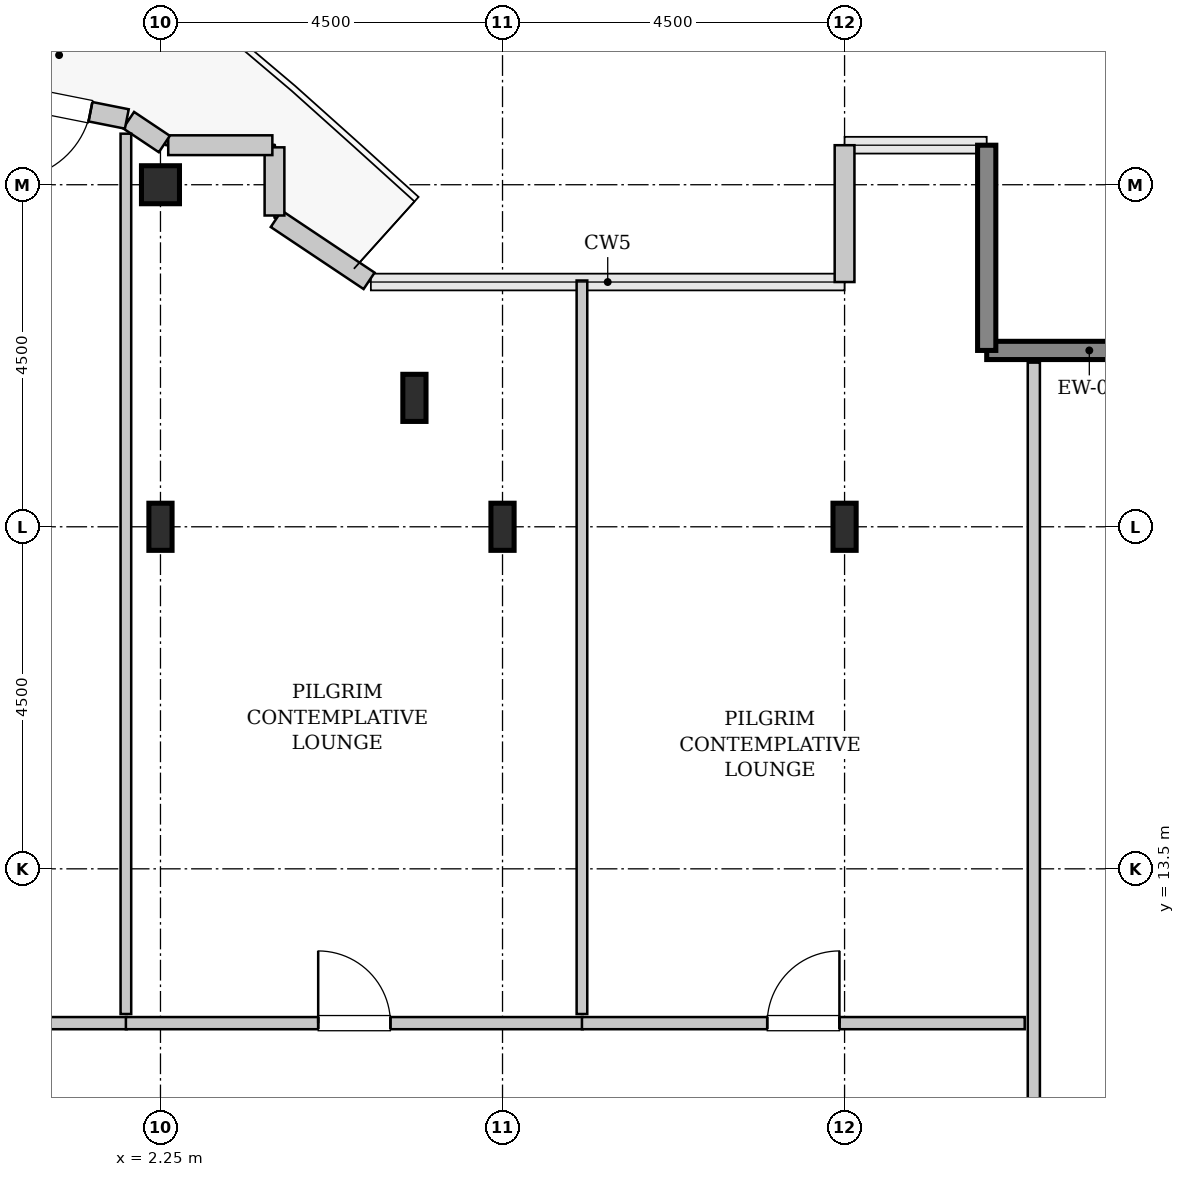
"""IFC4 building model, lengths in metres.
Left out: names, types, materials, properties, quantities, classifications, styles, units other than length and angle.
Written with IfcOpenShell. Run it as: python <this file> out.ifc"""

import sys

from ifc_helpers import new_model, si_unit, direction, frame, frame_2d, origin, origin_2d, place, context, subcontext, project, spatial, rectangle, hollow_rectangle, i_section, extrude, source, transform, mapped, element, fill, save


model = new_model("IFC4")
c1 = context("Model", 3, precision=1e-05, world=origin(), true_north=direction((0.0, 1.0)))
c2 = subcontext(c1, "Body", "Model", "MODEL_VIEW")
j1 = project(units=[si_unit("LENGTHUNIT", "METRE"), si_unit("PLANEANGLEUNIT", "RADIAN")], contexts=[c1])
p1 = place(None, origin())
s1 = spatial("IfcSite", under=j1, at=p1, CompositionType="ELEMENT")
p2 = place(p1, origin())
s2 = spatial("IfcBuilding", under=s1, at=p2, CompositionType="ELEMENT")
p3 = place(p2, frame((0.0, 0.0, 291.2)))
s3 = spatial("IfcBuildingStorey", under=s2, at=p3, CompositionType="ELEMENT", Elevation=291.2)
m1 = source(origin(), c2, "Body", "SweptSolid", [
    extrude(i_section(OverallWidth=0.305, OverallDepth=0.62, WebThickness=0.021, FlangeThickness=0.04, FilletRadius=0.027, at=origin_2d()), origin(), (0.0, 0.0, 1.0), 3.8),
])
p4 = place(p3, frame((2.25, 18.0, 0.0), z_axis=(0.0, 0.0, 1.0), x_axis=(1.0, 0.0, 0.0)))
e1 = element("IfcColumn", 1, at=p4, inside=s3, PredefinedType="COLUMN", context=c2, shape_type="MappedRepresentation", body=[
    mapped(m1, transform((0.0, 0.0, 0.0), x_axis=(1.0, 0.0, 0.0), y_axis=(0.0, 1.0, 0.0), z_axis=(0.0, 0.0, 1.0), scale=1.0)),
])
m2 = source(origin(), c2, "Body", "SweptSolid", [
    extrude(hollow_rectangle(XDim=0.5, YDim=0.5, WallThickness=0.025, InnerFilletRadius=0.025, OuterFilletRadius=0.05, at=origin_2d()), origin(), (0.0, 0.0, 1.0), 3.8),
])
p5 = place(p3, frame((2.25, 22.5, 0.0), z_axis=(0.0, 0.0, 1.0), x_axis=(1.0, 0.0, 0.0)))
e2 = element("IfcColumn", 2, at=p5, inside=s3, PredefinedType="COLUMN", context=c2, shape_type="MappedRepresentation", body=[
    mapped(m2, transform((0.0, 0.0, 0.0), x_axis=(1.0, 0.0, 0.0), y_axis=(0.0, 1.0, 0.0), z_axis=(0.0, 0.0, 1.0), scale=1.0)),
])
for number, where, z_axis, x_axis in (
    (3, (5.591, 19.696, 0.0), (0.0, 0.0, 1.0), (1.0, 0.0, 0.0)),
    (4, (6.75, 18.0, 0.0), (0.0, 0.0, 1.0), (1.0, 0.0, 0.0)),
    (5, (11.25, 18.0, 0.0), (0.0, 0.0, 1.0), (1.0, 0.0, 0.0)),
):
    element("IfcColumn", number, at=place(p3, frame(where, z_axis=z_axis, x_axis=x_axis)), inside=s3, PredefinedType="COLUMN", context=c2, shape_type="MappedRepresentation", body=[
        mapped(m1, transform((0.0, 0.0, 0.0), x_axis=(1.0, 0.0, 0.0), y_axis=(0.0, 1.0, 0.0), z_axis=(0.0, 0.0, 1.0), scale=1.0)),
    ])
m3 = source(origin(), c2, "Body", "SweptSolid", [
    extrude(rectangle(XDim=2.7, YDim=0.24, at=frame_2d((1.35, 0.0))), origin(), (0.0, 0.0, 1.0), 3.55),
])
for number, where, z_axis, x_axis in (
    (6, (15.82, 20.32, 0.0), (0.0, 0.0, 1.0), (-1.0, 0.0, 0.0)),
    (7, (13.12, 20.32, 0.0), (0.0, 0.0, 1.0), (0.0, 1.0, 0.0)),
):
    element("IfcWall", number, at=place(p3, frame(where, z_axis=z_axis, x_axis=x_axis)), inside=s3, PredefinedType="SHEAR", context=c2, shape_type="MappedRepresentation", body=[
        mapped(m3, transform((0.0, 0.0, 0.0), x_axis=(1.0, 0.0, 0.0), y_axis=(0.0, 1.0, 0.0), z_axis=(0.0, 0.0, 1.0), scale=1.0)),
    ])
m4 = source(origin(), c2, "Body", "SweptSolid", [
    extrude(rectangle(XDim=1.8, YDim=0.26, at=frame_2d((0.9, 0.0))), origin(), (0.0, 0.0, 1.0), 3.55),
])
p6 = place(p3, frame((11.25, 23.02, 0.0), z_axis=(0.0, 0.0, 1.0), x_axis=(0.0, -1.0, 0.0)))
e8 = element("IfcWall", 8, at=p6, inside=s3, PredefinedType="SOLIDWALL", context=c2, shape_type="MappedRepresentation", body=[
    mapped(m4, transform((0.0, 0.0, 0.0), x_axis=(1.0, 0.0, 0.0), y_axis=(0.0, 1.0, 0.0), z_axis=(0.0, 0.0, 1.0), scale=1.0)),
])
m5 = source(origin(), c2, "Body", "SweptSolid", [
    extrude(rectangle(XDim=1.469, YDim=0.26, at=frame_2d((0.734, 0.0))), origin(), (0.0, 0.0, 1.0), 3.55),
])
p7 = place(p3, frame((4.995, 21.236, 0.0), z_axis=(0.0, 0.0, 1.0), x_axis=(-0.831461760506, 0.555581983884, 0.0)))
e9 = element("IfcWall", 9, at=p7, inside=s3, PredefinedType="SOLIDWALL", context=c2, shape_type="MappedRepresentation", body=[
    mapped(m5, transform((0.0, 0.0, 0.0), x_axis=(1.0, 0.0, 0.0), y_axis=(0.0, 1.0, 0.0), z_axis=(0.0, 0.0, 1.0), scale=1.0)),
])
m6 = source(origin(), c2, "Body", "SweptSolid", [
    extrude(rectangle(XDim=0.897, YDim=0.26, at=frame_2d((0.448, 0.0))), origin(), (0.0, 0.0, 1.0), 3.55),
])
p8 = place(p3, frame((3.75, 22.095, 0.0), z_axis=(0.0, 0.0, 1.0), x_axis=(0.0, 1.0, 0.0)))
e10 = element("IfcWall", 10, at=p8, inside=s3, PredefinedType="SOLIDWALL", context=c2, shape_type="MappedRepresentation", body=[
    mapped(m6, transform((0.0, 0.0, 0.0), x_axis=(1.0, 0.0, 0.0), y_axis=(0.0, 1.0, 0.0), z_axis=(0.0, 0.0, 1.0), scale=1.0)),
])
m7 = source(origin(), c2, "Body", "SweptSolid", [
    extrude(rectangle(XDim=1.37, YDim=0.26, at=frame_2d((0.685, 0.0))), origin(), (0.0, 0.0, 1.0), 3.55),
])
p9 = place(p3, frame((3.722, 23.02, 0.0), z_axis=(0.0, 0.0, 1.0), x_axis=(-1.0, 0.0, 0.0)))
e11 = element("IfcWall", 11, at=p9, inside=s3, PredefinedType="SOLIDWALL", context=c2, shape_type="MappedRepresentation", body=[
    mapped(m7, transform((0.0, 0.0, 0.0), x_axis=(1.0, 0.0, 0.0), y_axis=(0.0, 1.0, 0.0), z_axis=(0.0, 0.0, 1.0), scale=1.0)),
])
m8 = source(origin(), c2, "Body", "SweptSolid", [
    extrude(rectangle(XDim=0.565, YDim=0.26, at=frame_2d((0.283, 0.0))), origin(), (0.0, 0.0, 1.0), 3.55),
])
p10 = place(p3, frame((2.301, 23.036, 0.0), z_axis=(0.0, 0.0, 1.0), x_axis=(-0.831651492666, 0.555297933317, 0.0)))
e12 = element("IfcWall", 12, at=p10, inside=s3, PredefinedType="SOLIDWALL", context=c2, shape_type="MappedRepresentation", body=[
    mapped(m8, transform((0.0, 0.0, 0.0), x_axis=(1.0, 0.0, 0.0), y_axis=(0.0, 1.0, 0.0), z_axis=(0.0, 0.0, 1.0), scale=1.0)),
])
m9 = source(origin(), c2, "Body", "SweptSolid", [
    extrude(rectangle(XDim=4.137, YDim=0.26, at=frame_2d((2.068, 0.0))), origin(), (0.0, 0.0, 1.0), 3.55),
])
p11 = place(p3, frame((1.807, 23.365, 0.0), z_axis=(0.0, 0.0, 1.0), x_axis=(-0.980782170794, 0.195105954428, 0.0)))
e13 = element("IfcWall", 13, at=p11, inside=s3, PredefinedType="SOLIDWALL", context=c2, shape_type="MappedRepresentation", body=[
    mapped(m9, transform((0.0, 0.0, 0.0), x_axis=(1.0, 0.0, 0.0), y_axis=(0.0, 1.0, 0.0), z_axis=(0.0, 0.0, 1.0), scale=1.0)),
])
p12 = place(p11, frame((0.488, 0.0, 0.0)))
e14 = element("IfcOpeningElement", 14, at=p12, cuts=e13, PredefinedType="OPENING", context=c2, shape_type="SweptSolid", body=[
    extrude(rectangle(XDim=1.1, YDim=2.2, at=frame_2d((0.55, 1.1))), frame((0.0, 0.14, 0.0), z_axis=(0.0, -1.0, 0.0), x_axis=(1.0, 0.0, 0.0)), (0.0, 0.0, 1.0), 0.28),
])
m10 = source(origin(), c2, "Body", "SweptSolid", [
    extrude(rectangle(XDim=11.665, YDim=0.16, at=frame_2d((5.833, 0.0))), origin(), (0.0, 0.0, 1.0), 3.535),
])
p13 = place(p3, frame((13.74, 8.495, 0.0), z_axis=(0.0, 0.0, 1.0), x_axis=(0.0, 1.0, 0.0)))
e15 = element("IfcWall", 15, at=p13, inside=s3, PredefinedType="PARTITIONING", context=c2, shape_type="MappedRepresentation", body=[
    mapped(m10, transform((0.0, 0.0, 0.0), x_axis=(1.0, 0.0, 0.0), y_axis=(0.0, 1.0, 0.0), z_axis=(0.0, 0.0, 1.0), scale=1.0)),
])
p14 = place(p13, frame((1.032, 0.0, 0.0)))
e16 = element("IfcOpeningElement", 16, at=p14, cuts=e15, PredefinedType="OPENING", context=c2, shape_type="SweptSolid", body=[
    extrude(rectangle(XDim=0.95, YDim=2.1, at=frame_2d((0.475, 1.05))), frame((0.0, 0.09, 0.0), z_axis=(0.0, -1.0, 0.0), x_axis=(1.0, 0.0, 0.0)), (0.0, 0.0, 1.0), 0.18),
])
m11 = source(origin(), c2, "Body", "SweptSolid", [
    extrude(rectangle(XDim=4.605, YDim=0.16, at=frame_2d((2.302, 0.0))), origin(), (0.0, 0.0, 1.0), 3.535),
])
p15 = place(p3, frame((-2.8, 11.47, 0.0), z_axis=(0.0, 0.0, 1.0), x_axis=(1.0, 0.0, 0.0)))
e17 = element("IfcWall", 17, at=p15, inside=s3, PredefinedType="PARTITIONING", context=c2, shape_type="MappedRepresentation", body=[
    mapped(m11, transform((0.0, 0.0, 0.0), x_axis=(1.0, 0.0, 0.0), y_axis=(0.0, 1.0, 0.0), z_axis=(0.0, 0.0, 1.0), scale=1.0)),
])
p16 = place(p15, frame((1.827, 0.0, 0.0)))
e18 = element("IfcOpeningElement", 18, at=p16, cuts=e17, PredefinedType="OPENING", context=c2, shape_type="SweptSolid", body=[
    extrude(rectangle(XDim=0.95, YDim=2.1, at=frame_2d((0.475, 1.05))), frame((0.0, 0.09, 0.0), z_axis=(0.0, -1.0, 0.0), x_axis=(1.0, 0.0, 0.0)), (0.0, 0.0, 1.0), 0.18),
])
m12 = source(origin(), c2, "Body", "SweptSolid", [
    extrude(rectangle(XDim=11.581, YDim=0.14, at=frame_2d((5.791, 0.0))), origin(), (0.0, 0.0, 1.0), 2.925),
])
p17 = place(p3, frame((1.795, 11.59, 0.0), z_axis=(0.0, 0.0, 1.0), x_axis=(0.0, 1.0, 0.0)))
e19 = element("IfcWall", 19, at=p17, inside=s3, PredefinedType="PARTITIONING", context=c2, shape_type="MappedRepresentation", body=[
    mapped(m12, transform((0.0, 0.0, 0.0), x_axis=(1.0, 0.0, 0.0), y_axis=(0.0, 1.0, 0.0), z_axis=(0.0, 0.0, 1.0), scale=1.0)),
])
m13 = source(origin(), c2, "Body", "SweptSolid", [
    extrude(rectangle(XDim=6.01, YDim=0.16, at=frame_2d((3.005, 0.0))), origin(), (0.0, 0.0, 1.0), 3.535),
])
p18 = place(p3, frame((1.795, 11.47, 0.0), z_axis=(0.0, 0.0, 1.0), x_axis=(1.0, 0.0, 0.0)))
e20 = element("IfcWall", 20, at=p18, inside=s3, PredefinedType="PARTITIONING", context=c2, shape_type="MappedRepresentation", body=[
    mapped(m13, transform((0.0, 0.0, 0.0), x_axis=(1.0, 0.0, 0.0), y_axis=(0.0, 1.0, 0.0), z_axis=(0.0, 0.0, 1.0), scale=1.0)),
])
p19 = place(p18, frame((2.53, 0.0, 0.0)))
e21 = element("IfcOpeningElement", 21, at=p19, cuts=e20, PredefinedType="OPENING", context=c2, shape_type="SweptSolid", body=[
    extrude(rectangle(XDim=0.95, YDim=2.1, at=frame_2d((0.475, 1.05))), frame((0.0, 0.09, 0.0), z_axis=(0.0, -1.0, 0.0), x_axis=(1.0, 0.0, 0.0)), (0.0, 0.0, 1.0), 0.18),
])
m14 = source(origin(), c2, "Body", "SweptSolid", [
    extrude(rectangle(XDim=9.65, YDim=0.14, at=frame_2d((4.825, 0.0))), origin(), (0.0, 0.0, 1.0), 3.535),
])
p20 = place(p3, frame((7.795, 11.59, 0.0), z_axis=(0.0, 0.0, 1.0), x_axis=(0.0, 1.0, 0.0)))
e22 = element("IfcWall", 22, at=p20, inside=s3, PredefinedType="PARTITIONING", context=c2, shape_type="MappedRepresentation", body=[
    mapped(m14, transform((0.0, 0.0, 0.0), x_axis=(1.0, 0.0, 0.0), y_axis=(0.0, 1.0, 0.0), z_axis=(0.0, 0.0, 1.0), scale=1.0)),
])
m15 = source(origin(), c2, "Body", "SweptSolid", [
    extrude(rectangle(XDim=5.825, YDim=0.16, at=frame_2d((2.913, 0.0))), origin(), (0.0, 0.0, 1.0), 3.535),
])
p21 = place(p3, frame((7.795, 11.47, 0.0), z_axis=(0.0, 0.0, 1.0), x_axis=(1.0, 0.0, 0.0)))
e23 = element("IfcWall", 23, at=p21, inside=s3, PredefinedType="PARTITIONING", context=c2, shape_type="MappedRepresentation", body=[
    mapped(m15, transform((0.0, 0.0, 0.0), x_axis=(1.0, 0.0, 0.0), y_axis=(0.0, 1.0, 0.0), z_axis=(0.0, 0.0, 1.0), scale=1.0)),
])
p22 = place(p21, frame((2.438, 0.0, 0.0)))
e24 = element("IfcOpeningElement", 24, at=p22, cuts=e23, PredefinedType="OPENING", context=c2, shape_type="SweptSolid", body=[
    extrude(rectangle(XDim=0.95, YDim=2.1, at=frame_2d((0.475, 1.05))), frame((0.0, 0.09, 0.0), z_axis=(0.0, -1.0, 0.0), x_axis=(1.0, 0.0, 0.0)), (0.0, 0.0, 1.0), 0.18),
])
m16 = source(origin(), c2, "Body", "SweptSolid", [
    extrude(rectangle(XDim=1.1, YDim=2.2, at=frame_2d((0.55, 1.1))), frame((0.0, 0.025, 0.0), z_axis=(0.0, -1.0, 0.0), x_axis=(1.0, 0.0, 0.0)), (0.0, 0.0, 1.0), 0.05),
])
p23 = place(p12, origin())
e25 = element("IfcDoor", 25, at=p23, inside=s3, OperationType="SINGLE_SWING_RIGHT", PredefinedType="DOOR", context=c2, shape_type="MappedRepresentation", body=[
    mapped(m16, transform((0.0, 0.0, 0.0), x_axis=(1.0, 0.0, 0.0), y_axis=(0.0, 1.0, 0.0), z_axis=(0.0, 0.0, 1.0), scale=1.0)),
])
fill(e14, e25)
m17 = source(origin(), c2, "Body", "SweptSolid", [
    extrude(rectangle(XDim=0.95, YDim=2.1, at=frame_2d((0.475, 1.05))), frame((0.0, 0.025, 0.0), z_axis=(0.0, -1.0, 0.0), x_axis=(1.0, 0.0, 0.0)), (0.0, 0.0, 1.0), 0.05),
])
p24 = place(p19, origin())
e26 = element("IfcDoor", 26, at=p24, inside=s3, OperationType="SINGLE_SWING_LEFT", PredefinedType="DOOR", context=c2, shape_type="MappedRepresentation", body=[
    mapped(m17, transform((0.0, 0.0, 0.0), x_axis=(1.0, 0.0, 0.0), y_axis=(0.0, 1.0, 0.0), z_axis=(0.0, 0.0, 1.0), scale=1.0)),
])
fill(e21, e26)
p25 = place(p22, origin())
e27 = element("IfcDoor", 27, at=p25, inside=s3, OperationType="SINGLE_SWING_RIGHT", PredefinedType="DOOR", context=c2, shape_type="MappedRepresentation", body=[
    mapped(m17, transform((0.0, 0.0, 0.0), x_axis=(1.0, 0.0, 0.0), y_axis=(0.0, 1.0, 0.0), z_axis=(0.0, 0.0, 1.0), scale=1.0)),
])
fill(e24, e27)
save(model, sys.argv[1])
